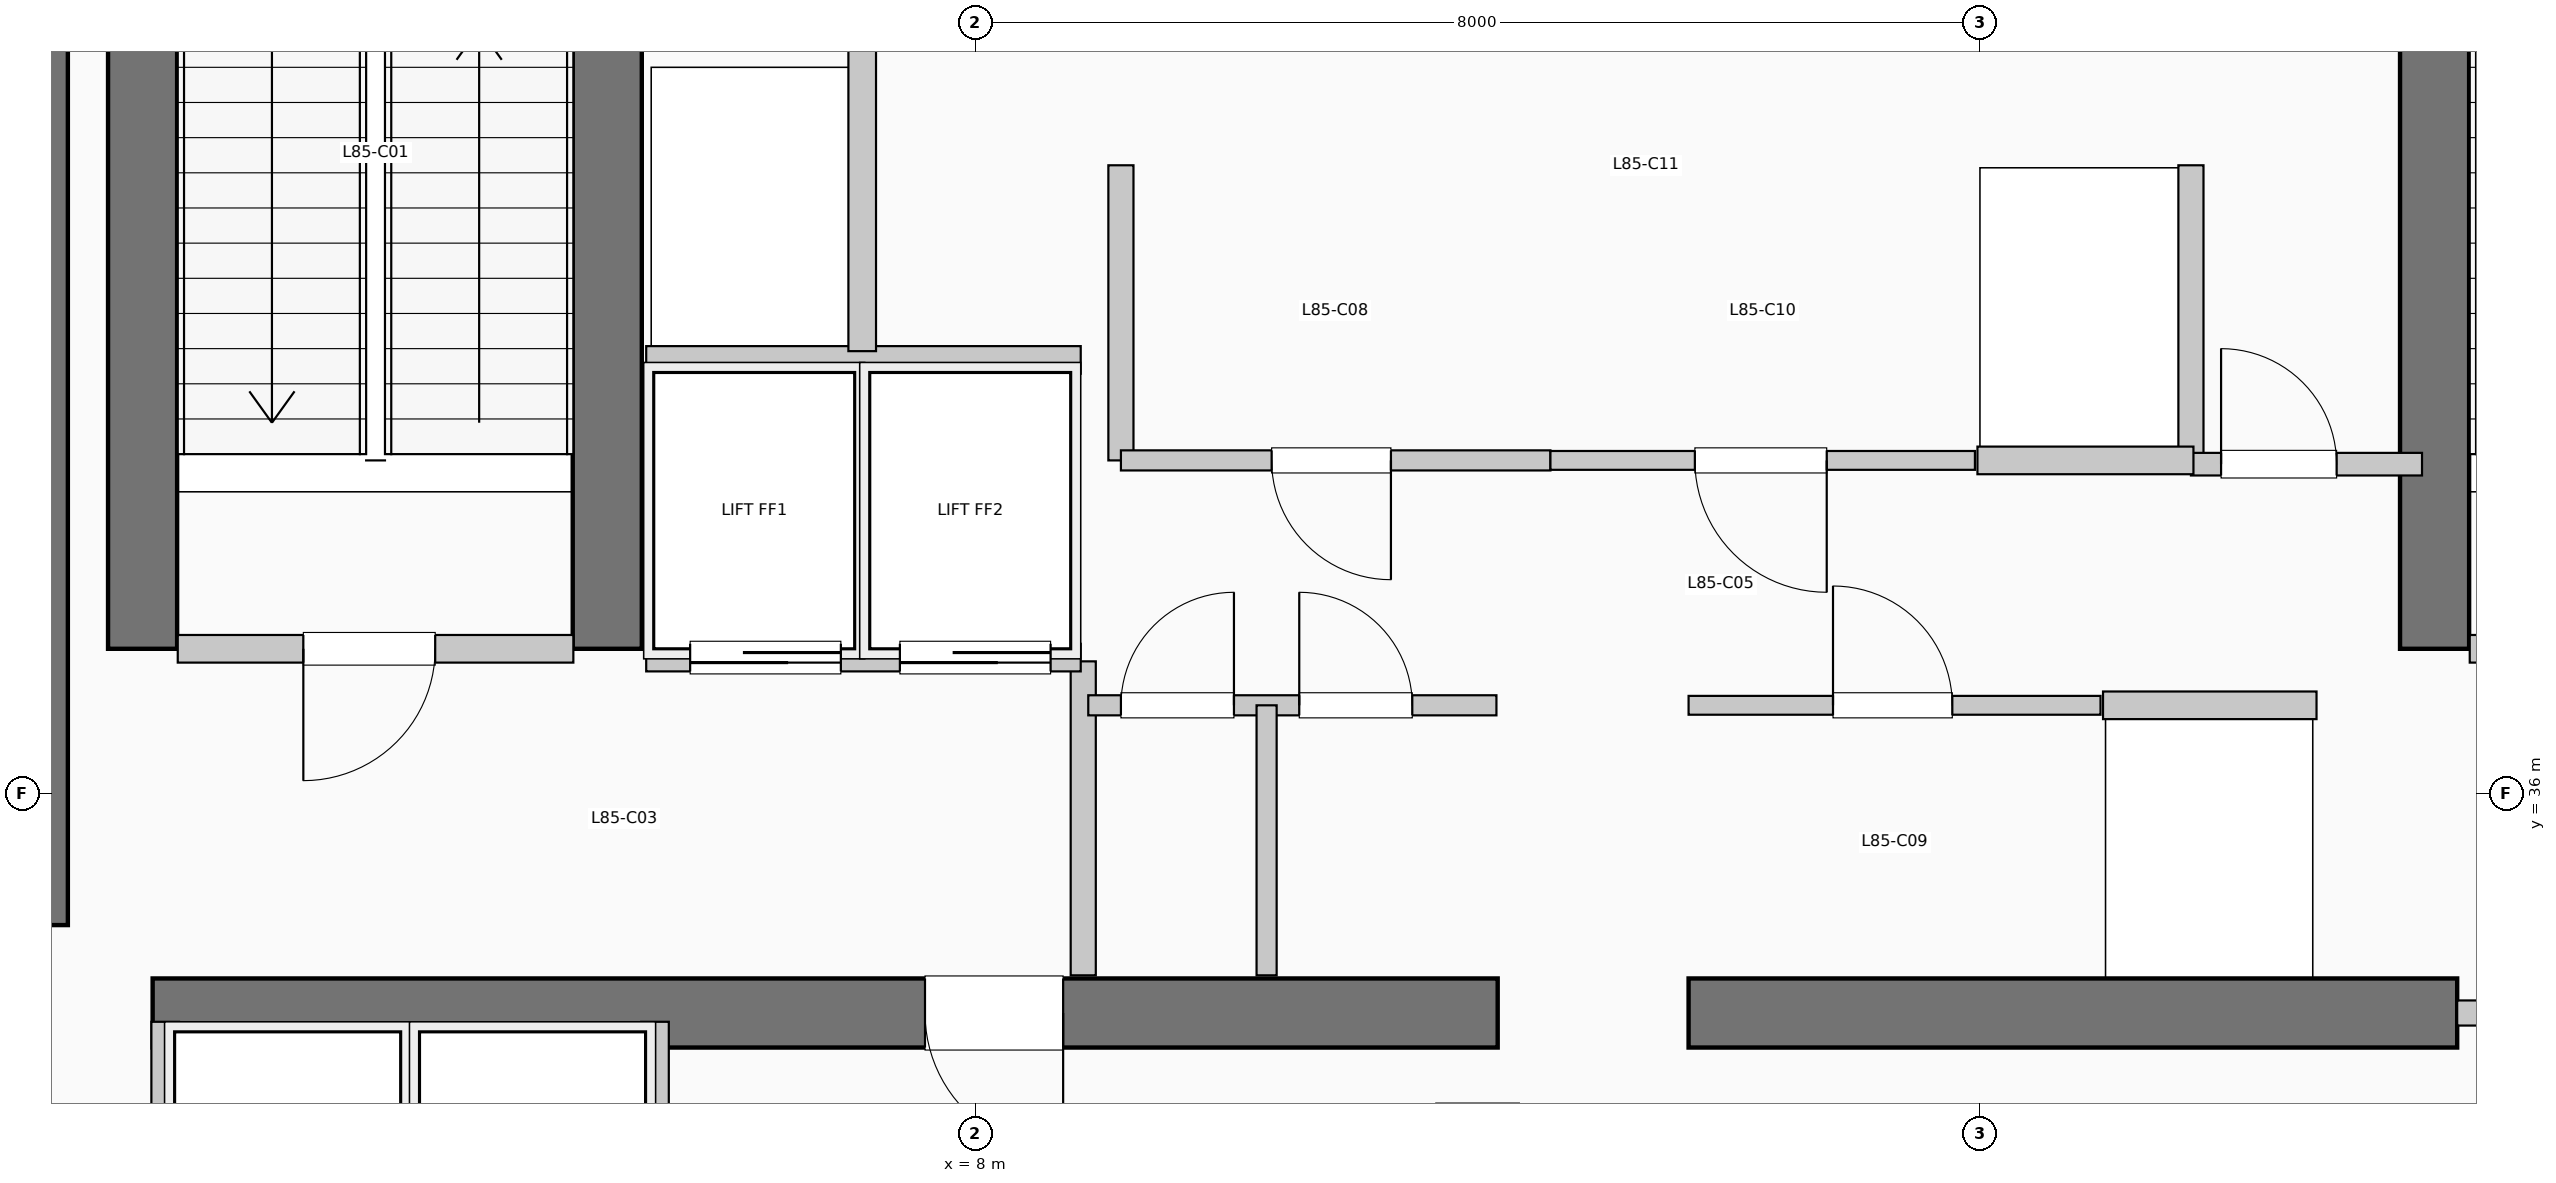
"""IFC4 building model, lengths in metres.
Left out: names, types, materials, properties, quantities, classifications, styles, units other than length and angle.
Written with IfcOpenShell. Run it as: python <this file> out.ifc"""

import sys

from ifc_helpers import new_model, si_unit, direction, frame, frame_2d, origin, place, context, subcontext, project, spatial, rectangle, extrude, element, fill, save


model = new_model("IFC4")
c1 = context("Model", 3, precision=1e-05, world=origin(), true_north=direction((0.0, 1.0)))
c2 = subcontext(c1, "Body", "Model", "MODEL_VIEW")
j1 = project(units=[si_unit("LENGTHUNIT", "METRE"), si_unit("PLANEANGLEUNIT", "RADIAN")], contexts=[c1])
p1 = place(None, origin())
s1 = spatial("IfcSite", under=j1, at=p1, CompositionType="ELEMENT")
p2 = place(p1, origin())
s2 = spatial("IfcBuilding", under=s1, at=p2, CompositionType="ELEMENT")
p3 = place(p2, frame((0.0, 0.0, 347.49)))
s3 = spatial("IfcBuildingStorey", under=s2, at=p3, CompositionType="ELEMENT", Elevation=347.49)
p4 = place(p3, frame((0.5, 34.95, 0.0), z_axis=(0.0, 0.0, 1.0), x_axis=(0.0, 1.0, 0.0)))
e1 = element("IfcWall", 1, at=p4, inside=s3, PredefinedType="SHEAR", context=c2, shape_type="SweptSolid", body=[
    extrude(rectangle(XDim=7.9, YDim=0.55, at=frame_2d((3.95, 0.0))), origin(), (0.0, 0.0, 1.0), 4.62),
])
p5 = place(p3, frame((1.45, 34.25, 0.0), z_axis=(0.0, 0.0, 1.0), x_axis=(1.0, 0.0, 0.0)))
e2 = element("IfcWall", 2, at=p5, inside=s3, PredefinedType="SHEAR", context=c2, shape_type="SweptSolid", body=[
    extrude(rectangle(XDim=10.71, YDim=0.55, at=frame_2d((5.355, 0.0))), origin(), (0.0, 0.0, 1.0), 4.62),
])
p6 = place(p5, frame((7.25, 0.0, 0.0), z_axis=(0.0, 0.0, 1.0), x_axis=(-1.0, 0.0, 0.0)))
e3 = element("IfcOpeningElement", 3, at=p6, cuts=e2, PredefinedType="OPENING", context=c2, shape_type="SweptSolid", body=[
    extrude(rectangle(XDim=1.1, YDim=2.15, at=frame_2d((0.55, 1.075))), frame((0.0, 0.285, 0.0), z_axis=(0.0, -1.0, 0.0), x_axis=(1.0, 0.0, 0.0)), (0.0, 0.0, 1.0), 0.57),
])
p7 = place(p3, frame((13.68, 34.25, 0.0), z_axis=(0.0, 0.0, 1.0), x_axis=(1.0, 0.0, 0.0)))
e4 = element("IfcWall", 4, at=p7, inside=s3, PredefinedType="SHEAR", context=c2, shape_type="SweptSolid", body=[
    extrude(rectangle(XDim=6.12, YDim=0.55, at=frame_2d((3.06, 0.0))), origin(), (0.0, 0.0, 1.0), 4.62),
])
for number, where, z_axis, x_axis in (
    (5, (1.37, 37.15, 0.0), (0.0, 0.0, 1.0), (0.0, 1.0, 0.0)),
    (6, (5.07, 37.15, 0.0), (0.0, 0.0, 1.0), (0.0, 1.0, 0.0)),
    (7, (19.62, 37.15, 0.0), (0.0, 0.0, 1.0), (0.0, 1.0, 0.0)),
):
    element("IfcWall", number, at=place(p3, frame(where, z_axis=z_axis, x_axis=x_axis)), inside=s3, PredefinedType="SHEAR", context=c2, shape_type="SweptSolid", body=[
        extrude(rectangle(XDim=7.89, YDim=0.55, at=frame_2d((3.945, 0.0))), origin(), (0.0, 0.0, 1.0), 4.62),
    ])
p8 = place(p3, frame((1.65, 37.15, 0.0), z_axis=(0.0, 0.0, 1.0), x_axis=(1.0, 0.0, 0.0)))
e8 = element("IfcWall", 8, at=p8, inside=s3, PredefinedType="PARTITIONING", context=c2, shape_type="SweptSolid", body=[
    extrude(rectangle(XDim=3.15, YDim=0.22, at=frame_2d((1.575, 0.0))), origin(), (0.0, 0.0, 1.0), 4.37),
])
p9 = place(p8, frame((2.05, 0.0, 0.0), z_axis=(0.0, 0.0, 1.0), x_axis=(-1.0, 0.0, 0.0)))
e9 = element("IfcOpeningElement", 9, at=p9, cuts=e8, PredefinedType="OPENING", context=c2, shape_type="SweptSolid", body=[
    extrude(rectangle(XDim=1.05, YDim=2.15, at=frame_2d((0.525, 1.075))), frame((0.0, 0.12, 0.0), z_axis=(0.0, -1.0, 0.0), x_axis=(1.0, 0.0, 0.0)), (0.0, 0.0, 1.0), 0.24),
])
p10 = place(p3, frame((8.86, 34.55, 0.0), z_axis=(0.0, 0.0, 1.0), x_axis=(0.0, 1.0, 0.0)))
e10 = element("IfcWall", 10, at=p10, inside=s3, PredefinedType="PARTITIONING", context=c2, shape_type="SweptSolid", body=[
    extrude(rectangle(XDim=2.5, YDim=0.2, at=frame_2d((1.25, 0.0))), origin(), (0.0, 0.0, 1.0), 4.37),
])
p11 = place(p3, frame((19.9, 37.15, 0.0), z_axis=(0.0, 0.0, 1.0), x_axis=(1.0, 0.0, 0.0)))
e11 = element("IfcWall", 11, at=p11, inside=s3, PredefinedType="PARTITIONING", context=c2, shape_type="SweptSolid", body=[
    extrude(rectangle(XDim=3.15, YDim=0.22, at=frame_2d((1.575, 0.0))), origin(), (0.0, 0.0, 1.0), 4.37),
])
p12 = place(p11, frame((2.05, 0.0, 0.0), z_axis=(0.0, 0.0, 1.0), x_axis=(-1.0, 0.0, 0.0)))
e12 = element("IfcOpeningElement", 12, at=p12, cuts=e11, PredefinedType="OPENING", context=c2, shape_type="SweptSolid", body=[
    extrude(rectangle(XDim=1.05, YDim=2.15, at=frame_2d((0.525, 1.075))), frame((0.0, 0.12, 0.0), z_axis=(0.0, -1.0, 0.0), x_axis=(1.0, 0.0, 0.0)), (0.0, 0.0, 1.0), 0.24),
])
p13 = place(p3, frame((19.8, 34.25, 0.0), z_axis=(0.0, 0.0, 1.0), x_axis=(1.0, 0.0, 0.0)))
e13 = element("IfcWall", 13, at=p13, inside=s3, PredefinedType="PARTITIONING", context=c2, shape_type="SweptSolid", body=[
    extrude(rectangle(XDim=3.25, YDim=0.2, at=frame_2d((1.625, 0.0))), origin(), (0.0, 0.0, 1.0), 4.37),
])
p14 = place(p13, frame((2.15, 0.0, 0.0), z_axis=(0.0, 0.0, 1.0), x_axis=(-1.0, 0.0, 0.0)))
e14 = element("IfcOpeningElement", 14, at=p14, cuts=e13, PredefinedType="OPENING", context=c2, shape_type="SweptSolid", body=[
    extrude(rectangle(XDim=1.1, YDim=2.15, at=frame_2d((0.55, 1.075))), frame((0.0, 0.11, 0.0), z_axis=(0.0, -1.0, 0.0), x_axis=(1.0, 0.0, 0.0)), (0.0, 0.0, 1.0), 0.22),
])
p15 = place(p3, frame((5.38, 37.08, 0.0), z_axis=(0.0, 0.0, 1.0), x_axis=(1.0, 0.0, 0.0)))
e15 = element("IfcWall", 15, at=p15, inside=s3, PredefinedType="PARTITIONING", context=c2, shape_type="SweptSolid", body=[
    extrude(rectangle(XDim=3.46, YDim=0.22, at=frame_2d((1.73, 0.0))), origin(), (0.0, 0.0, 1.0), 4.37),
])
p16 = place(p15, frame((1.55, 0.0, 0.0), z_axis=(0.0, 0.0, 1.0), x_axis=(-1.0, 0.0, 0.0)))
e16 = element("IfcOpeningElement", 16, at=p16, cuts=e15, PredefinedType="OPENING", context=c2, shape_type="SweptSolid", body=[
    extrude(rectangle(XDim=1.2, YDim=2.2, at=frame_2d((0.6, 1.1))), frame((0.0, 0.12, 0.0), z_axis=(0.0, -1.0, 0.0), x_axis=(1.0, 0.0, 0.0)), (0.0, 0.0, 1.0), 0.24),
])
p17 = place(p15, frame((3.22, 0.0, 0.0), z_axis=(0.0, 0.0, 1.0), x_axis=(-1.0, 0.0, 0.0)))
e17 = element("IfcOpeningElement", 17, at=p17, cuts=e15, PredefinedType="OPENING", context=c2, shape_type="SweptSolid", body=[
    extrude(rectangle(XDim=1.2, YDim=2.2, at=frame_2d((0.6, 1.1))), frame((0.0, 0.12, 0.0), z_axis=(0.0, -1.0, 0.0), x_axis=(1.0, 0.0, 0.0)), (0.0, 0.0, 1.0), 0.24),
])
p18 = place(p3, frame((5.38, 39.45, 0.0), z_axis=(0.0, 0.0, 1.0), x_axis=(1.0, 0.0, 0.0)))
e18 = element("IfcWall", 18, at=p18, inside=s3, PredefinedType="PARTITIONING", context=c2, shape_type="SweptSolid", body=[
    extrude(rectangle(XDim=3.46, YDim=0.22, at=frame_2d((1.73, 0.0))), origin(), (0.0, 0.0, 1.0), 4.37),
])
p19 = place(p3, frame((7.1, 39.52, 0.0), z_axis=(0.0, 0.0, 1.0), x_axis=(0.0, 1.0, 0.0)))
e19 = element("IfcWall", 19, at=p19, inside=s3, PredefinedType="PARTITIONING", context=c2, shape_type="SweptSolid", body=[
    extrude(rectangle(XDim=2.93, YDim=0.22, at=frame_2d((1.465, 0.0))), origin(), (0.0, 0.0, 1.0), 4.37),
])
for number, where, z_axis, x_axis in (
    (20, (1.55, 31.8, 0.0), (0.0, 0.0, 1.0), (0.0, 1.0, 0.0)),
    (21, (5.45, 31.8, 0.0), (0.0, 0.0, 1.0), (0.0, 1.0, 0.0)),
):
    element("IfcWall", number, at=place(p3, frame(where, z_axis=z_axis, x_axis=x_axis)), inside=s3, PredefinedType="PARTITIONING", context=c2, shape_type="SweptSolid", body=[
        extrude(rectangle(XDim=2.38, YDim=0.22, at=frame_2d((1.19, 0.0))), origin(), (0.0, 0.0, 1.0), 4.37),
    ])
for number, where, z_axis, x_axis in (
    (22, (9.16, 38.65, 0.0), (0.0, 0.0, 1.0), (0.0, 1.0, 0.0)),
    (23, (17.68, 38.65, 0.0), (0.0, 0.0, 1.0), (0.0, 1.0, 0.0)),
):
    element("IfcWall", number, at=place(p3, frame(where, z_axis=z_axis, x_axis=x_axis)), inside=s3, PredefinedType="PARTITIONING", context=c2, shape_type="SweptSolid", body=[
        extrude(rectangle(XDim=2.35, YDim=0.2, at=frame_2d((1.175, 0.0))), origin(), (0.0, 0.0, 1.0), 4.37),
    ])
p20 = place(p3, frame((17.68, 38.62, 0.0), z_axis=(0.0, 0.0, 1.0), x_axis=(1.0, 0.0, 0.0)))
e24 = element("IfcWall", 24, at=p20, inside=s3, PredefinedType="PARTITIONING", context=c2, shape_type="SweptSolid", body=[
    extrude(rectangle(XDim=1.84, YDim=0.18, at=frame_2d((0.92, 0.0))), origin(), (0.0, 0.0, 1.0), 4.37),
])
p21 = place(p20, frame((0.24, 0.0, 0.0)))
e25 = element("IfcOpeningElement", 25, at=p21, cuts=e24, PredefinedType="OPENING", context=c2, shape_type="SweptSolid", body=[
    extrude(rectangle(XDim=0.92, YDim=2.1, at=frame_2d((0.46, 1.05))), frame((0.0, 0.1, 0.0), z_axis=(0.0, -1.0, 0.0), x_axis=(1.0, 0.0, 0.0)), (0.0, 0.0, 1.0), 0.2),
])
p22 = place(p3, frame((8.9, 36.7, 0.0), z_axis=(0.0, 0.0, 1.0), x_axis=(1.0, 0.0, 0.0)))
e26 = element("IfcWall", 26, at=p22, inside=s3, PredefinedType="PARTITIONING", context=c2, shape_type="SweptSolid", body=[
    extrude(rectangle(XDim=3.25, YDim=0.16, at=frame_2d((1.625, 0.0))), origin(), (0.0, 0.0, 1.0), 4.37),
])
p23 = place(p22, frame((0.26, 0.0, 0.0)))
e27 = element("IfcOpeningElement", 27, at=p23, cuts=e26, PredefinedType="OPENING", context=c2, shape_type="SweptSolid", body=[
    extrude(rectangle(XDim=0.9, YDim=2.15, at=frame_2d((0.45, 1.075))), frame((0.0, 0.09, 0.0), z_axis=(0.0, -1.0, 0.0), x_axis=(1.0, 0.0, 0.0)), (0.0, 0.0, 1.0), 0.18),
])
p24 = place(p22, frame((1.68, 0.0, 0.0)))
e28 = element("IfcOpeningElement", 28, at=p24, cuts=e26, PredefinedType="OPENING", context=c2, shape_type="SweptSolid", body=[
    extrude(rectangle(XDim=0.9, YDim=2.15, at=frame_2d((0.45, 1.075))), frame((0.0, 0.09, 0.0), z_axis=(0.0, -1.0, 0.0), x_axis=(1.0, 0.0, 0.0)), (0.0, 0.0, 1.0), 0.18),
])
p25 = place(p3, frame((10.32, 34.55, 0.0), z_axis=(0.0, 0.0, 1.0), x_axis=(0.0, 1.0, 0.0)))
e29 = element("IfcWall", 29, at=p25, inside=s3, PredefinedType="PARTITIONING", context=c2, shape_type="SweptSolid", body=[
    extrude(rectangle(XDim=2.15, YDim=0.16, at=frame_2d((1.075, 0.0))), origin(), (0.0, 0.0, 1.0), 4.37),
])
p26 = place(p3, frame((9.16, 38.65, 0.0), z_axis=(0.0, 0.0, 1.0), x_axis=(1.0, 0.0, 0.0)))
e30 = element("IfcWall", 30, at=p26, inside=s3, PredefinedType="PARTITIONING", context=c2, shape_type="SweptSolid", body=[
    extrude(rectangle(XDim=3.42, YDim=0.16, at=frame_2d((1.71, 0.0))), origin(), (0.0, 0.0, 1.0), 4.37),
])
p27 = place(p26, frame((2.15, 0.0, 0.0), z_axis=(0.0, 0.0, 1.0), x_axis=(-1.0, 0.0, 0.0)))
e31 = element("IfcOpeningElement", 31, at=p27, cuts=e30, PredefinedType="OPENING", context=c2, shape_type="SweptSolid", body=[
    extrude(rectangle(XDim=0.95, YDim=2.15, at=frame_2d((0.475, 1.075))), frame((0.0, 0.09, 0.0), z_axis=(0.0, -1.0, 0.0), x_axis=(1.0, 0.0, 0.0)), (0.0, 0.0, 1.0), 0.18),
])
p28 = place(p3, frame((13.68, 36.7, 0.0), z_axis=(0.0, 0.0, 1.0), x_axis=(1.0, 0.0, 0.0)))
e32 = element("IfcWall", 32, at=p28, inside=s3, PredefinedType="PARTITIONING", context=c2, shape_type="SweptSolid", body=[
    extrude(rectangle(XDim=3.28, YDim=0.15, at=frame_2d((1.64, 0.0))), origin(), (0.0, 0.0, 1.0), 4.37),
])
p29 = place(p28, frame((1.15, 0.0, 0.0)))
e33 = element("IfcOpeningElement", 33, at=p29, cuts=e32, PredefinedType="OPENING", context=c2, shape_type="SweptSolid", body=[
    extrude(rectangle(XDim=0.95, YDim=2.15, at=frame_2d((0.475, 1.075))), frame((0.0, 0.085, 0.0), z_axis=(0.0, -1.0, 0.0), x_axis=(1.0, 0.0, 0.0)), (0.0, 0.0, 1.0), 0.17),
])
p30 = place(p3, frame((12.58, 38.65, 0.0), z_axis=(0.0, 0.0, 1.0), x_axis=(1.0, 0.0, 0.0)))
e34 = element("IfcWall", 34, at=p30, inside=s3, PredefinedType="PARTITIONING", context=c2, shape_type="SweptSolid", body=[
    extrude(rectangle(XDim=3.38, YDim=0.15, at=frame_2d((1.69, 0.0))), origin(), (0.0, 0.0, 1.0), 4.37),
])
p31 = place(p30, frame((2.2, 0.0, 0.0), z_axis=(0.0, 0.0, 1.0), x_axis=(-1.0, 0.0, 0.0)))
e35 = element("IfcOpeningElement", 35, at=p31, cuts=e34, PredefinedType="OPENING", context=c2, shape_type="SweptSolid", body=[
    extrude(rectangle(XDim=1.05, YDim=2.15, at=frame_2d((0.525, 1.075))), frame((0.0, 0.085, 0.0), z_axis=(0.0, -1.0, 0.0), x_axis=(1.0, 0.0, 0.0)), (0.0, 0.0, 1.0), 0.17),
])
p32 = place(p3, frame((16.98, 36.7, 0.0), z_axis=(0.0, 0.0, 1.0), x_axis=(1.0, 0.0, 0.0)))
e36 = element("IfcWall", 36, at=p32, inside=s3, PredefinedType="PARTITIONING", context=c2, shape_type="SweptSolid", body=[
    extrude(rectangle(XDim=1.7, YDim=0.22, at=frame_2d((0.85, 0.0))), origin(), (0.0, 0.0, 1.0), 4.37),
])
p33 = place(p3, frame((15.98, 38.65, 0.0), z_axis=(0.0, 0.0, 1.0), x_axis=(1.0, 0.0, 0.0)))
e37 = element("IfcWall", 37, at=p33, inside=s3, PredefinedType="PARTITIONING", context=c2, shape_type="SweptSolid", body=[
    extrude(rectangle(XDim=1.72, YDim=0.22, at=frame_2d((0.86, 0.0))), origin(), (0.0, 0.0, 1.0), 4.37),
])
p34 = place(p9, origin())
e38 = element("IfcDoor", 38, at=p34, inside=s3, OperationType="SINGLE_SWING_LEFT", PredefinedType="DOOR", context=c2, shape_type="SweptSolid", body=[
    extrude(rectangle(XDim=1.05, YDim=2.15, at=frame_2d((0.525, 1.075))), frame((0.0, 0.025, 0.0), z_axis=(0.0, -1.0, 0.0), x_axis=(1.0, 0.0, 0.0)), (0.0, 0.0, 1.0), 0.05),
])
fill(e9, e38)
p35 = place(p6, origin())
e39 = element("IfcDoor", 39, at=p35, inside=s3, OperationType="SINGLE_SWING_RIGHT", PredefinedType="DOOR", context=c2, shape_type="SweptSolid", body=[
    extrude(rectangle(XDim=1.1, YDim=2.15, at=frame_2d((0.55, 1.075))), frame((0.0, 0.025, 0.0), z_axis=(0.0, -1.0, 0.0), x_axis=(1.0, 0.0, 0.0)), (0.0, 0.0, 1.0), 0.05),
])
fill(e3, e39)
p36 = place(p16, origin())
e40 = element("IfcDoor", 40, at=p36, inside=s3, OperationType="SLIDING_TO_RIGHT", PredefinedType="DOOR", context=c2, shape_type="SweptSolid", body=[
    extrude(rectangle(XDim=1.2, YDim=2.2, at=frame_2d((0.6, 1.1))), frame((0.0, 0.025, 0.0), z_axis=(0.0, -1.0, 0.0), x_axis=(1.0, 0.0, 0.0)), (0.0, 0.0, 1.0), 0.05),
])
fill(e16, e40)
p37 = place(p17, origin())
e41 = element("IfcDoor", 41, at=p37, inside=s3, OperationType="SLIDING_TO_RIGHT", PredefinedType="DOOR", context=c2, shape_type="SweptSolid", body=[
    extrude(rectangle(XDim=1.2, YDim=2.2, at=frame_2d((0.6, 1.1))), frame((0.0, 0.025, 0.0), z_axis=(0.0, -1.0, 0.0), x_axis=(1.0, 0.0, 0.0)), (0.0, 0.0, 1.0), 0.05),
])
fill(e17, e41)
p38 = place(p21, origin())
e42 = element("IfcDoor", 42, at=p38, inside=s3, OperationType="SINGLE_SWING_LEFT", PredefinedType="DOOR", context=c2, shape_type="SweptSolid", body=[
    extrude(rectangle(XDim=0.92, YDim=2.1, at=frame_2d((0.46, 1.05))), frame((0.0, 0.025, 0.0), z_axis=(0.0, -1.0, 0.0), x_axis=(1.0, 0.0, 0.0)), (0.0, 0.0, 1.0), 0.05),
])
fill(e25, e42)
p39 = place(p23, origin())
e43 = element("IfcDoor", 43, at=p39, inside=s3, OperationType="SINGLE_SWING_RIGHT", PredefinedType="DOOR", context=c2, shape_type="SweptSolid", body=[
    extrude(rectangle(XDim=0.9, YDim=2.15, at=frame_2d((0.45, 1.075))), frame((0.0, 0.025, 0.0), z_axis=(0.0, -1.0, 0.0), x_axis=(1.0, 0.0, 0.0)), (0.0, 0.0, 1.0), 0.05),
])
fill(e27, e43)
p40 = place(p24, origin())
e44 = element("IfcDoor", 44, at=p40, inside=s3, OperationType="SINGLE_SWING_LEFT", PredefinedType="DOOR", context=c2, shape_type="SweptSolid", body=[
    extrude(rectangle(XDim=0.9, YDim=2.15, at=frame_2d((0.45, 1.075))), frame((0.0, 0.025, 0.0), z_axis=(0.0, -1.0, 0.0), x_axis=(1.0, 0.0, 0.0)), (0.0, 0.0, 1.0), 0.05),
])
fill(e28, e44)
p41 = place(p27, origin())
e45 = element("IfcDoor", 45, at=p41, inside=s3, OperationType="SINGLE_SWING_RIGHT", PredefinedType="DOOR", context=c2, shape_type="SweptSolid", body=[
    extrude(rectangle(XDim=0.95, YDim=2.15, at=frame_2d((0.475, 1.075))), frame((0.0, 0.025, 0.0), z_axis=(0.0, -1.0, 0.0), x_axis=(1.0, 0.0, 0.0)), (0.0, 0.0, 1.0), 0.05),
])
fill(e31, e45)
p42 = place(p29, origin())
e46 = element("IfcDoor", 46, at=p42, inside=s3, OperationType="SINGLE_SWING_LEFT", PredefinedType="DOOR", context=c2, shape_type="SweptSolid", body=[
    extrude(rectangle(XDim=0.95, YDim=2.15, at=frame_2d((0.475, 1.075))), frame((0.0, 0.025, 0.0), z_axis=(0.0, -1.0, 0.0), x_axis=(1.0, 0.0, 0.0)), (0.0, 0.0, 1.0), 0.05),
])
fill(e33, e46)
p43 = place(p31, origin())
e47 = element("IfcDoor", 47, at=p43, inside=s3, OperationType="SINGLE_SWING_RIGHT", PredefinedType="DOOR", context=c2, shape_type="SweptSolid", body=[
    extrude(rectangle(XDim=1.05, YDim=2.15, at=frame_2d((0.525, 1.075))), frame((0.0, 0.025, 0.0), z_axis=(0.0, -1.0, 0.0), x_axis=(1.0, 0.0, 0.0)), (0.0, 0.0, 1.0), 0.05),
])
fill(e35, e47)
save(model, sys.argv[1])
